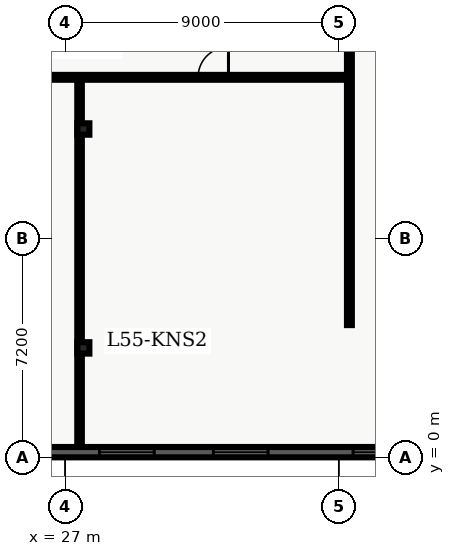
"""IFC4 building model, lengths in metres.
Left out: names, types, materials, properties, quantities, classifications, styles, units other than length and angle.
Written with IfcOpenShell. Run it as: python <this file> out.ifc"""

import sys

from ifc_helpers import new_model, entity, si_unit, converted_unit, direction, frame, origin_with_axes, origin_2d_with_axis, place, context, subcontext, project, spatial, polyline, rectangle, i_section, outline, extrude, element, fill, save


model = new_model("IFC4")
c1 = context("Model", 3, precision=1e-05, world=origin_with_axes(), true_north=direction((0.0, 1.0)))
c2 = subcontext(c1, "Body", "Model", "MODEL_VIEW")
j1 = project(units=[si_unit("LENGTHUNIT", "METRE"), converted_unit("PLANEANGLEUNIT", "DEGREE", entity("IfcPlaneAngleMeasure", 0.017), si_unit("PLANEANGLEUNIT", "RADIAN"), dimensions=[0, 0, 0, 0, 0, 0, 0])], contexts=[c1])
p1 = place(None, origin_with_axes())
s1 = spatial("IfcSite", under=j1, at=p1, CompositionType="ELEMENT")
p2 = place(p1, origin_with_axes())
s2 = spatial("IfcBuilding", under=s1, at=p2, CompositionType="ELEMENT")
p3 = place(p2, frame((0.0, 0.0, 224.7), z_axis=(0.0, 0.0, 1.0), x_axis=(1.0, 0.0, 0.0)))
s3 = spatial("IfcBuildingStorey", under=s2, at=p3, CompositionType="ELEMENT", Elevation=224.7)
for number, where, z_axis, x_axis in (
    (1, (27.6, 3.6, 0.0), (0.0, 0.0, 1.0), (1.0, 0.0, 0.0)),
    (2, (27.6, 10.8, 0.0), (0.0, 0.0, 1.0), (1.0, 0.0, 0.0)),
):
    element("IfcColumn", number, at=place(p3, frame(where, z_axis=z_axis, x_axis=x_axis)), inside=s3, PredefinedType="COLUMN", context=c2, shape_type="SweptSolid", body=[
        extrude(i_section(OverallWidth=0.394, OverallDepth=0.375, WebThickness=0.017, FlangeThickness=0.028, FilletRadius=0.02, at=origin_2d_with_axis()), origin_with_axes(), (0.0, 0.0, 1.0), 3.9),
    ])
p4 = place(p3, frame((20.3, 12.5, 0.0), z_axis=(0.0, 0.0, 1.0), x_axis=(1.0, 0.0, 0.0)))
e3 = element("IfcWall", 3, at=p4, inside=s3, PredefinedType="PARTITIONING", context=c2, shape_type="SweptSolid", body=[
    extrude(outline(polyline([(0.0, -0.08), (16.05, -0.08), (16.05, 0.08), (0.0, 0.08), (0.0, -0.08)])), origin_with_axes(), (0.0, 0.0, 1.0), 2.7),
])
p5 = place(p4, frame((3.677, 0.0, 0.0), z_axis=(0.0, 0.0, 1.0), x_axis=(1.0, 0.0, 0.0)))
e4 = element("IfcOpeningElement", 4, at=p5, cuts=e3, PredefinedType="OPENING", context=c2, shape_type="SweptSolid", body=[
    extrude(rectangle(XDim=1.0, YDim=0.18, at=origin_2d_with_axis()), origin_with_axes(), (0.0, 0.0, 1.0), 2.15),
])
p6 = place(p4, frame((11.572, 0.0, 0.0), z_axis=(0.0, 0.0, 1.0), x_axis=(1.0, 0.0, 0.0)))
e5 = element("IfcOpeningElement", 5, at=p6, cuts=e3, PredefinedType="OPENING", context=c2, shape_type="SweptSolid", body=[
    extrude(rectangle(XDim=1.0, YDim=0.18, at=origin_2d_with_axis()), origin_with_axes(), (0.0, 0.0, 1.0), 2.15),
])
p7 = place(p3, frame((36.35, 4.35, 0.0), z_axis=(0.0, 0.0, 1.0), x_axis=(0.0, 1.0, 0.0)))
e6 = element("IfcWall", 6, at=p7, inside=s3, PredefinedType="PARTITIONING", context=c2, shape_type="SweptSolid", body=[
    extrude(outline(polyline([(0.0, -0.08), (16.95, -0.08), (16.95, 0.08), (0.0, 0.08), (0.0, -0.08)])), origin_with_axes(), (0.0, 0.0, 1.0), 2.7),
])
p8 = place(p3, frame((27.474, 0.335, 0.0), z_axis=(0.0, 0.0, 1.0), x_axis=(0.0, 1.0, 0.0)))
e7 = element("IfcWall", 7, at=p8, inside=s3, PredefinedType="PARTITIONING", context=c2, shape_type="SweptSolid", body=[
    extrude(outline(polyline([(0.0, -0.075), (12.045, -0.075), (12.045, 0.075), (0.0, 0.075), (0.0, -0.075)])), origin_with_axes(), (0.0, 0.0, 1.0), 2.7),
])
p9 = place(p3, frame((49.46, 0.17, 0.0), z_axis=(0.0, 0.0, 1.0), x_axis=(-1.0, 0.0, 0.0)))
e8 = element("IfcWall", 8, at=p9, inside=s3, PredefinedType="SOLIDWALL", context=c2, shape_type="SweptSolid", body=[
    extrude(outline(polyline([(0.0, -0.17), (42.56, -0.17), (42.56, 0.17), (0.0, 0.17), (0.0, -0.17)])), origin_with_axes(), (0.0, 0.0, 1.0), 3.66),
])
p10 = place(p9, frame((2.898, 0.0, 0.45), z_axis=(0.0, 0.0, 1.0), x_axis=(1.0, 0.0, 0.0)))
e9 = element("IfcOpeningElement", 9, at=p10, cuts=e8, PredefinedType="OPENING", context=c2, shape_type="SweptSolid", body=[
    extrude(rectangle(XDim=1.8, YDim=0.36, at=origin_2d_with_axis()), origin_with_axes(), (0.0, 0.0, 1.0), 2.1),
])
p11 = place(p9, frame((7.493, 0.0, 0.45), z_axis=(0.0, 0.0, 1.0), x_axis=(1.0, 0.0, 0.0)))
e10 = element("IfcOpeningElement", 10, at=p11, cuts=e8, PredefinedType="OPENING", context=c2, shape_type="SweptSolid", body=[
    extrude(rectangle(XDim=1.8, YDim=0.36, at=origin_2d_with_axis()), origin_with_axes(), (0.0, 0.0, 1.0), 2.1),
])
p12 = place(p9, frame((12.089, 0.0, 0.45), z_axis=(0.0, 0.0, 1.0), x_axis=(1.0, 0.0, 0.0)))
e11 = element("IfcOpeningElement", 11, at=p12, cuts=e8, PredefinedType="OPENING", context=c2, shape_type="SweptSolid", body=[
    extrude(rectangle(XDim=1.8, YDim=0.36, at=origin_2d_with_axis()), origin_with_axes(), (0.0, 0.0, 1.0), 2.1),
])
p13 = place(p9, frame((16.684, 0.0, 0.45), z_axis=(0.0, 0.0, 1.0), x_axis=(1.0, 0.0, 0.0)))
e12 = element("IfcOpeningElement", 12, at=p13, cuts=e8, PredefinedType="OPENING", context=c2, shape_type="SweptSolid", body=[
    extrude(rectangle(XDim=1.8, YDim=0.36, at=origin_2d_with_axis()), origin_with_axes(), (0.0, 0.0, 1.0), 2.1),
])
p14 = place(p9, frame((20.43, 0.0, 0.45), z_axis=(0.0, 0.0, 1.0), x_axis=(1.0, 0.0, 0.0)))
e13 = element("IfcOpeningElement", 13, at=p14, cuts=e8, PredefinedType="OPENING", context=c2, shape_type="SweptSolid", body=[
    extrude(rectangle(XDim=1.8, YDim=0.36, at=origin_2d_with_axis()), origin_with_axes(), (0.0, 0.0, 1.0), 2.1),
])
p15 = place(p9, frame((25.876, 0.0, 0.45), z_axis=(0.0, 0.0, 1.0), x_axis=(1.0, 0.0, 0.0)))
e14 = element("IfcOpeningElement", 14, at=p15, cuts=e8, PredefinedType="OPENING", context=c2, shape_type="SweptSolid", body=[
    extrude(rectangle(XDim=1.8, YDim=0.36, at=origin_2d_with_axis()), origin_with_axes(), (0.0, 0.0, 1.0), 2.1),
])
p16 = place(p9, frame((30.471, 0.0, 0.45), z_axis=(0.0, 0.0, 1.0), x_axis=(1.0, 0.0, 0.0)))
e15 = element("IfcOpeningElement", 15, at=p16, cuts=e8, PredefinedType="OPENING", context=c2, shape_type="SweptSolid", body=[
    extrude(rectangle(XDim=1.8, YDim=0.36, at=origin_2d_with_axis()), origin_with_axes(), (0.0, 0.0, 1.0), 2.1),
])
p17 = place(p9, frame((34.617, 0.0, 0.45), z_axis=(0.0, 0.0, 1.0), x_axis=(1.0, 0.0, 0.0)))
e16 = element("IfcOpeningElement", 16, at=p17, cuts=e8, PredefinedType="OPENING", context=c2, shape_type="SweptSolid", body=[
    extrude(rectangle(XDim=1.8, YDim=0.36, at=origin_2d_with_axis()), origin_with_axes(), (0.0, 0.0, 1.0), 2.1),
])
p18 = place(p9, frame((39.662, 0.0, 0.45), z_axis=(0.0, 0.0, 1.0), x_axis=(1.0, 0.0, 0.0)))
e17 = element("IfcOpeningElement", 17, at=p18, cuts=e8, PredefinedType="OPENING", context=c2, shape_type="SweptSolid", body=[
    extrude(rectangle(XDim=1.8, YDim=0.36, at=origin_2d_with_axis()), origin_with_axes(), (0.0, 0.0, 1.0), 2.1),
])
p19 = place(p4, frame((11.572, 0.0, 0.0), z_axis=(0.0, 0.0, 1.0), x_axis=(1.0, 0.0, 0.0)))
e18 = element("IfcDoor", 18, at=p19, inside=s3, OperationType="SINGLE_SWING_RIGHT", PredefinedType="DOOR", context=c2, shape_type="SweptSolid", body=[
    extrude(rectangle(XDim=1.0, YDim=0.09, at=origin_2d_with_axis()), origin_with_axes(), (0.0, 0.0, 1.0), 2.15),
])
fill(e5, e18)
p20 = place(p9, frame((12.089, 0.0, 0.45), z_axis=(0.0, 0.0, 1.0), x_axis=(1.0, 0.0, 0.0)))
e19 = element("IfcWindow", 19, at=p20, inside=s3, PredefinedType="WINDOW", context=c2, shape_type="SweptSolid", body=[
    extrude(rectangle(XDim=1.8, YDim=0.09, at=origin_2d_with_axis()), origin_with_axes(), (0.0, 0.0, 1.0), 2.1),
])
fill(e11, e19)
p21 = place(p9, frame((16.684, 0.0, 0.45), z_axis=(0.0, 0.0, 1.0), x_axis=(1.0, 0.0, 0.0)))
e20 = element("IfcWindow", 20, at=p21, inside=s3, PredefinedType="WINDOW", context=c2, shape_type="SweptSolid", body=[
    extrude(rectangle(XDim=1.8, YDim=0.09, at=origin_2d_with_axis()), origin_with_axes(), (0.0, 0.0, 1.0), 2.1),
])
fill(e12, e20)
p22 = place(p9, frame((20.43, 0.0, 0.45), z_axis=(0.0, 0.0, 1.0), x_axis=(1.0, 0.0, 0.0)))
e21 = element("IfcWindow", 21, at=p22, inside=s3, PredefinedType="WINDOW", context=c2, shape_type="SweptSolid", body=[
    extrude(rectangle(XDim=1.8, YDim=0.09, at=origin_2d_with_axis()), origin_with_axes(), (0.0, 0.0, 1.0), 2.1),
])
fill(e13, e21)
save(model, sys.argv[1])
